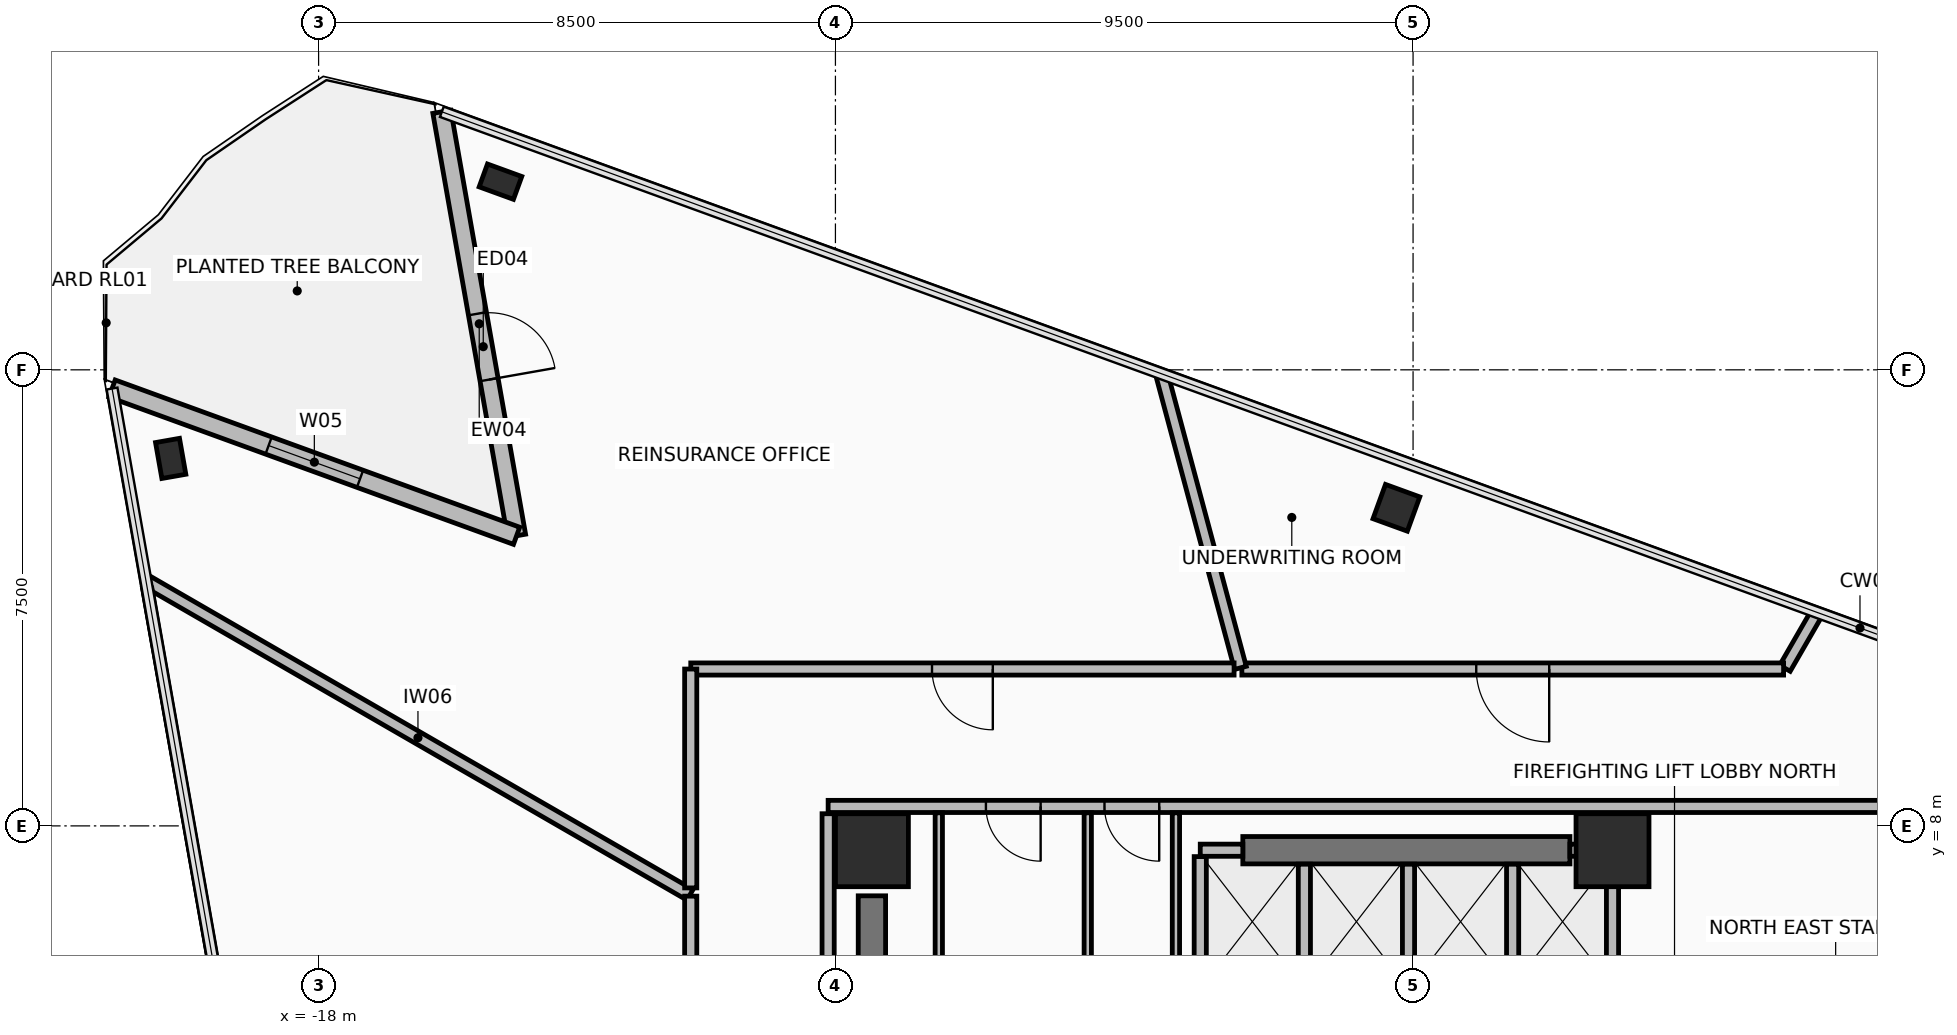
"""IFC4 building model, lengths in metres.
Left out: names, types, materials, properties, quantities, classifications, styles, units other than length and angle.
Written with IfcOpenShell. Run it as: python <this file> out.ifc"""

import sys

from ifc_helpers import new_model, si_unit, direction, frame, frame_2d, origin, origin_2d, place, context, subcontext, project, spatial, rectangle, hollow_rectangle, extrude, element, fill, save


model = new_model("IFC4")
c1 = context("Model", 3, precision=1e-05, world=origin(), true_north=direction((0.0, 1.0)))
c2 = subcontext(c1, "Body", "Model", "MODEL_VIEW")
j1 = project(units=[si_unit("LENGTHUNIT", "METRE"), si_unit("PLANEANGLEUNIT", "RADIAN")], contexts=[c1])
p1 = place(None, origin())
s1 = spatial("IfcSite", under=j1, at=p1, CompositionType="ELEMENT")
p2 = place(p1, origin())
s2 = spatial("IfcBuilding", under=s1, at=p2, CompositionType="ELEMENT")
p3 = place(p2, frame((0.0, 0.0, 177.7)))
s3 = spatial("IfcBuildingStorey", under=s2, at=p3, CompositionType="ELEMENT", Elevation=177.7)
for number, where, z_axis, x_axis in (
    (1, (3.28, 7.6, 0.0), (0.0, 0.0, 1.0), (1.0, 0.0, 0.0)),
    (2, (-8.9, 7.6, 0.0), (0.0, 0.0, 1.0), (1.0, 0.0, 0.0)),
):
    element("IfcColumn", number, at=place(p3, frame(where, z_axis=z_axis, x_axis=x_axis)), inside=s3, PredefinedType="COLUMN", context=c2, shape_type="SweptSolid", body=[
        extrude(rectangle(XDim=1.2, YDim=1.2, at=origin_2d()), origin(), (0.0, 0.0, 1.0), 3.6),
    ])
p4 = place(p3, frame((-20.433, 14.043, 0.0), z_axis=(0.0, 0.0, 1.0), x_axis=(-0.173648177667, 0.984807753012, 0.0)))
e3 = element("IfcColumn", 3, at=p4, inside=s3, PredefinedType="COLUMN", context=c2, shape_type="SweptSolid", body=[
    extrude(hollow_rectangle(XDim=0.4, YDim=0.6, WallThickness=0.03, at=origin_2d()), origin(), (0.0, 0.0, 1.0), 3.6),
])
p5 = place(p3, frame((-0.274, 13.231, 0.0), z_axis=(0.0, 0.0, 1.0), x_axis=(-0.939692023847, 0.342021783398, 0.0)))
e4 = element("IfcColumn", 4, at=p5, inside=s3, PredefinedType="COLUMN", context=c2, shape_type="SweptSolid", body=[
    extrude(hollow_rectangle(XDim=0.6, YDim=0.6, WallThickness=0.036, at=origin_2d()), origin(), (0.0, 0.0, 1.0), 3.6),
])
p6 = place(p3, frame((-15.009, 18.594, 0.0), z_axis=(0.0, 0.0, 1.0), x_axis=(-0.939692023847, 0.342021783398, 0.0)))
e5 = element("IfcColumn", 5, at=p6, inside=s3, PredefinedType="COLUMN", context=c2, shape_type="SweptSolid", body=[
    extrude(hollow_rectangle(XDim=0.4, YDim=0.6, WallThickness=0.03, at=origin_2d()), origin(), (0.0, 0.0, 1.0), 3.6),
])
p7 = place(p3, frame((-15.973, 19.743, 0.0), z_axis=(0.0, 0.0, 1.0), x_axis=(0.173651569749, -0.984807154891, 0.0)))
e6 = element("IfcWall", 6, at=p7, inside=s3, PredefinedType="STANDARD", context=c2, shape_type="SweptSolid", body=[
    extrude(rectangle(XDim=7.08, YDim=0.3, at=frame_2d((3.54, 0.0))), origin(), (0.0, 0.0, 1.0), 2.715),
])
p8 = place(p7, frame((3.372, 0.0, 0.0)))
e7 = element("IfcOpeningElement", 7, at=p8, cuts=e6, PredefinedType="OPENING", context=c2, shape_type="SweptSolid", body=[
    extrude(rectangle(XDim=1.1, YDim=2.2, at=frame_2d((0.55, 1.1))), frame((0.0, 0.16, 0.0), z_axis=(0.0, -1.0, 0.0), x_axis=(1.0, 0.0, 0.0)), (0.0, 0.0, 1.0), 0.32),
])
p9 = place(p3, frame((-14.744, 12.771, 0.0), z_axis=(0.0, 0.0, 1.0), x_axis=(-0.939687665182, 0.342033758429, 0.0)))
e8 = element("IfcWall", 8, at=p9, inside=s3, PredefinedType="STANDARD", context=c2, shape_type="SweptSolid", body=[
    extrude(rectangle(XDim=7.08, YDim=0.3, at=frame_2d((3.54, 0.0))), origin(), (0.0, 0.0, 1.0), 2.715),
])
p10 = place(p9, frame((2.74, 0.0, 0.335)))
e9 = element("IfcOpeningElement", 9, at=p10, cuts=e8, PredefinedType="OPENING", context=c2, shape_type="SweptSolid", body=[
    extrude(rectangle(XDim=1.6, YDim=2.2, at=frame_2d((0.8, 1.1))), frame((0.0, 0.16, 0.0), z_axis=(0.0, -1.0, 0.0), x_axis=(1.0, 0.0, 0.0)), (0.0, 0.0, 1.0), 0.32),
])
p11 = place(p3, frame((-2.8, 7.6, 0.0), z_axis=(0.0, 0.0, 1.0), x_axis=(1.0, 0.0, 0.0)))
e10 = element("IfcWall", 10, at=p11, inside=s3, PredefinedType="SHEAR", context=c2, shape_type="SweptSolid", body=[
    extrude(rectangle(XDim=5.38, YDim=0.45, at=frame_2d((2.69, 0.0))), origin(), (0.0, 0.0, 1.0), 3.42),
])
p12 = place(p3, frame((-8.9, -3.85, 0.0), z_axis=(0.0, 0.0, 1.0), x_axis=(0.0, 1.0, 0.0)))
e11 = element("IfcWall", 11, at=p12, inside=s3, PredefinedType="SHEAR", context=c2, shape_type="SweptSolid", body=[
    extrude(rectangle(XDim=10.7, YDim=0.45, at=frame_2d((5.35, 0.0))), origin(), (0.0, 0.0, 1.0), 3.42),
])
p13 = place(p3, frame((9.62, 8.32, 0.0), z_axis=(0.0, 0.0, 1.0), x_axis=(-1.0, 0.0, 0.0)))
e12 = element("IfcWall", 12, at=p13, inside=s3, PredefinedType="PARTITIONING", context=c2, shape_type="SweptSolid", body=[
    extrude(rectangle(XDim=19.24, YDim=0.2, at=frame_2d((9.62, 0.0))), origin(), (0.0, 0.0, 1.0), 2.765),
])
p14 = place(p13, frame((15.745, 0.0, 0.0)))
e13 = element("IfcOpeningElement", 13, at=p14, cuts=e12, PredefinedType="OPENING", context=c2, shape_type="SweptSolid", body=[
    extrude(rectangle(XDim=0.9, YDim=2.1, at=frame_2d((0.45, 1.05))), frame((0.0, 0.11, 0.0), z_axis=(0.0, -1.0, 0.0), x_axis=(1.0, 0.0, 0.0)), (0.0, 0.0, 1.0), 0.22),
])
p15 = place(p13, frame((13.795, 0.0, 0.0)))
e14 = element("IfcOpeningElement", 14, at=p15, cuts=e12, PredefinedType="OPENING", context=c2, shape_type="SweptSolid", body=[
    extrude(rectangle(XDim=0.9, YDim=2.1, at=frame_2d((0.45, 1.05))), frame((0.0, 0.11, 0.0), z_axis=(0.0, -1.0, 0.0), x_axis=(1.0, 0.0, 0.0)), (0.0, 0.0, 1.0), 0.22),
])
p16 = place(p3, frame((-9.62, 8.2, 0.0), z_axis=(0.0, 0.0, 1.0), x_axis=(0.0, -1.0, 0.0)))
e15 = element("IfcWall", 15, at=p16, inside=s3, PredefinedType="PARTITIONING", context=c2, shape_type="SweptSolid", body=[
    extrude(rectangle(XDim=16.4, YDim=0.2, at=frame_2d((8.2, 0.0))), origin(), (0.0, 0.0, 1.0), 2.765),
])
p17 = place(p16, frame((12.65, 0.0, 0.0)))
e16 = element("IfcOpeningElement", 16, at=p17, cuts=e15, PredefinedType="OPENING", context=c2, shape_type="SweptSolid", body=[
    extrude(rectangle(XDim=1.1, YDim=2.15, at=frame_2d((0.55, 1.075))), frame((0.0, 0.11, 0.0), z_axis=(0.0, -1.0, 0.0), x_axis=(1.0, 0.0, 0.0)), (0.0, 0.0, 1.0), 0.22),
])
p18 = place(p3, frame((-3.5, 7.6, 0.0), z_axis=(0.0, 0.0, 1.0), x_axis=(1.0, 0.0, 0.0)))
e17 = element("IfcWall", 17, at=p18, inside=s3, PredefinedType="PARTITIONING", context=c2, shape_type="SweptSolid", body=[
    extrude(rectangle(XDim=0.7, YDim=0.2, at=frame_2d((0.35, 0.0))), origin(), (0.0, 0.0, 1.0), 2.715),
])
p19 = place(p3, frame((-3.5, 5.38, 0.0), z_axis=(0.0, 0.0, 1.0), x_axis=(0.0, 1.0, 0.0)))
e18 = element("IfcWall", 18, at=p19, inside=s3, PredefinedType="PARTITIONING", context=c2, shape_type="SweptSolid", body=[
    extrude(rectangle(XDim=2.115, YDim=0.2, at=frame_2d((1.058, 0.0))), origin(), (0.0, 0.0, 1.0), 2.715),
])
for number, where, z_axis, x_axis in (
    (19, (-1.788, 5.38, 0.0), (0.0, 0.0, 1.0), (0.0, 1.0, 0.0)),
    (20, (-0.075, 5.38, 0.0), (0.0, 0.0, 1.0), (0.0, 1.0, 0.0)),
    (21, (1.637, 5.38, 0.0), (0.0, 0.0, 1.0), (0.0, 1.0, 0.0)),
):
    element("IfcWall", number, at=place(p3, frame(where, z_axis=z_axis, x_axis=x_axis)), inside=s3, PredefinedType="PARTITIONING", context=c2, shape_type="SweptSolid", body=[
        extrude(rectangle(XDim=1.99, YDim=0.2, at=frame_2d((0.995, 0.0))), origin(), (0.0, 0.0, 1.0), 2.715),
    ])
p20 = place(p3, frame((2.58, 7.6, 0.0), z_axis=(0.0, 0.0, 1.0), x_axis=(1.0, 0.0, 0.0)))
e22 = element("IfcWall", 22, at=p20, inside=s3, PredefinedType="PARTITIONING", context=c2, shape_type="SweptSolid", body=[
    extrude(rectangle(XDim=0.7, YDim=0.2, at=frame_2d((0.35, 0.0))), origin(), (0.0, 0.0, 1.0), 2.715),
])
p21 = place(p3, frame((3.28, 5.38, 0.0), z_axis=(0.0, 0.0, 1.0), x_axis=(0.0, 1.0, 0.0)))
e23 = element("IfcWall", 23, at=p21, inside=s3, PredefinedType="PARTITIONING", context=c2, shape_type="SweptSolid", body=[
    extrude(rectangle(XDim=2.115, YDim=0.2, at=frame_2d((1.058, 0.0))), origin(), (0.0, 0.0, 1.0), 2.715),
])
for number, where, z_axis, x_axis in (
    (24, (-5.35, 4.765, 0.0), (0.0, 0.0, 1.0), (0.0, 1.0, 0.0)),
    (25, (-7.8, 8.215, 0.0), (0.0, 0.0, 1.0), (0.0, -1.0, 0.0)),
    (26, (-3.9, 4.765, 0.0), (0.0, 0.0, 1.0), (0.0, 1.0, 0.0)),
):
    element("IfcWall", number, at=place(p3, frame(where, z_axis=z_axis, x_axis=x_axis)), inside=s3, PredefinedType="PARTITIONING", context=c2, shape_type="SweptSolid", body=[
        extrude(rectangle(XDim=3.45, YDim=0.12, at=frame_2d((1.725, 0.0))), origin(), (0.0, 0.0, 1.0), 2.715),
    ])
p22 = place(p3, frame((-20.839, 12.031, 0.0), z_axis=(0.0, 0.0, 1.0), x_axis=(0.866031318101, -0.499989755964, 0.0)))
e27 = element("IfcWall", 27, at=p22, inside=s3, PredefinedType="PARTITIONING", context=c2, shape_type="SweptSolid", body=[
    extrude(rectangle(XDim=10.331, YDim=0.2, at=frame_2d((5.166, 0.0))), origin(), (0.0, 0.0, 1.0), 2.715),
])
p23 = place(p3, frame((-11.88, 6.844, 0.0), z_axis=(0.0, 0.0, 1.0), x_axis=(0.0, -1.0, 0.0)))
e28 = element("IfcWall", 28, at=p23, inside=s3, PredefinedType="PARTITIONING", context=c2, shape_type="SweptSolid", body=[
    extrude(rectangle(XDim=10.009, YDim=0.2, at=frame_2d((5.004, 0.0))), origin(), (0.0, 0.0, 1.0), 3.42),
])
p24 = place(p23, frame((4.579, 0.0, 0.0)))
e29 = element("IfcOpeningElement", 29, at=p24, cuts=e28, PredefinedType="OPENING", context=c2, shape_type="SweptSolid", body=[
    extrude(rectangle(XDim=0.85, YDim=2.1, at=frame_2d((0.425, 1.05))), frame((0.0, 0.11, 0.0), z_axis=(0.0, -1.0, 0.0), x_axis=(1.0, 0.0, 0.0)), (0.0, 0.0, 1.0), 0.22),
])
p25 = place(p3, frame((-17.878, -4.762, 0.0), z_axis=(0.0, 0.0, 1.0), x_axis=(-0.173655243618, 0.984806507068, 0.0)))
e30 = element("IfcWall", 30, at=p25, inside=s3, PredefinedType="PARTITIONING", context=c2, shape_type="SweptSolid", body=[
    extrude(rectangle(XDim=16.916, YDim=0.15, at=frame_2d((8.458, 0.0))), origin(), (0.0, 0.0, 1.0), 3.42),
])
p26 = place(p3, frame((6.631, 11.485, 0.0), z_axis=(0.0, 0.0, 1.0), x_axis=(-0.500139438976, -0.865944883685, 0.0)))
e31 = element("IfcWall", 31, at=p26, inside=s3, PredefinedType="PARTITIONING", context=c2, shape_type="SweptSolid", body=[
    extrude(rectangle(XDim=1.031, YDim=0.2, at=frame_2d((0.515, 0.0))), origin(), (0.0, 0.0, 1.0), 2.715),
])
p27 = place(p3, frame((6.094, 10.58, 0.0), z_axis=(0.0, 0.0, 1.0), x_axis=(-1.0, 0.0, 0.0)))
e32 = element("IfcWall", 32, at=p27, inside=s3, PredefinedType="PARTITIONING", context=c2, shape_type="SweptSolid", body=[
    extrude(rectangle(XDim=8.91, YDim=0.2, at=frame_2d((4.455, 0.0))), origin(), (0.0, 0.0, 1.0), 2.865),
])
p28 = place(p27, frame((3.855, 0.0, 0.0)))
e33 = element("IfcOpeningElement", 33, at=p28, cuts=e32, PredefinedType="OPENING", context=c2, shape_type="SweptSolid", body=[
    extrude(rectangle(XDim=1.2, YDim=2.15, at=frame_2d((0.6, 1.075))), frame((0.0, 0.11, 0.0), z_axis=(0.0, -1.0, 0.0), x_axis=(1.0, 0.0, 0.0)), (0.0, 0.0, 1.0), 0.22),
])
p29 = place(p3, frame((-2.84, 10.598, 0.0), z_axis=(0.0, 0.0, 1.0), x_axis=(-0.258815701251, 0.965926722265, 0.0)))
e34 = element("IfcWall", 34, at=p29, inside=s3, PredefinedType="PARTITIONING", context=c2, shape_type="SweptSolid", body=[
    extrude(rectangle(XDim=5.007, YDim=0.2, at=frame_2d((2.503, 0.0))), origin(), (0.0, 0.0, 1.0), 2.715),
])
p30 = place(p3, frame((-2.944, 10.58, 0.0), z_axis=(0.0, 0.0, 1.0), x_axis=(-1.0, 0.0, 0.0)))
e35 = element("IfcWall", 35, at=p30, inside=s3, PredefinedType="PARTITIONING", context=c2, shape_type="SweptSolid", body=[
    extrude(rectangle(XDim=8.936, YDim=0.2, at=frame_2d((4.468, 0.0))), origin(), (0.0, 0.0, 1.0), 2.765),
])
p31 = place(p30, frame((3.968, 0.0, 0.0)))
e36 = element("IfcOpeningElement", 36, at=p31, cuts=e35, PredefinedType="OPENING", context=c2, shape_type="SweptSolid", body=[
    extrude(rectangle(XDim=1.0, YDim=2.15, at=frame_2d((0.5, 1.075))), frame((0.0, 0.11, 0.0), z_axis=(0.0, -1.0, 0.0), x_axis=(1.0, 0.0, 0.0)), (0.0, 0.0, 1.0), 0.22),
])
p32 = place(p3, frame((-11.88, 10.579, 0.0), z_axis=(0.0, 0.0, 1.0), x_axis=(0.0, -1.0, 0.0)))
e37 = element("IfcWall", 37, at=p32, inside=s3, PredefinedType="PARTITIONING", context=c2, shape_type="SweptSolid", body=[
    extrude(rectangle(XDim=3.599, YDim=0.2, at=frame_2d((1.8, 0.0))), origin(), (0.0, 0.0, 1.0), 2.765),
])
p33 = place(p8, frame((1.1, 0.0, 0.0), z_axis=(0.0, 0.0, 1.0), x_axis=(-1.0, 0.0, 0.0)))
e38 = element("IfcDoor", 38, at=p33, inside=s3, OperationType="SINGLE_SWING_LEFT", PredefinedType="DOOR", context=c2, shape_type="SweptSolid", body=[
    extrude(rectangle(XDim=1.1, YDim=2.2, at=frame_2d((0.55, 1.1))), frame((0.0, 0.025, 0.0), z_axis=(0.0, -1.0, 0.0), x_axis=(1.0, 0.0, 0.0)), (0.0, 0.0, 1.0), 0.05),
])
fill(e7, e38)
p34 = place(p10, origin())
e39 = element("IfcWindow", 39, at=p34, inside=s3, PartitioningType="SINGLE_PANEL", PredefinedType="WINDOW", context=c2, shape_type="SweptSolid", body=[
    extrude(rectangle(XDim=1.6, YDim=2.2, at=frame_2d((0.8, 1.1))), frame((0.0, 0.03, 0.0), z_axis=(0.0, -1.0, 0.0), x_axis=(1.0, 0.0, 0.0)), (0.0, 0.0, 1.0), 0.06),
])
fill(e9, e39)
p35 = place(p14, origin())
e40 = element("IfcDoor", 40, at=p35, inside=s3, OperationType="SINGLE_SWING_LEFT", PredefinedType="DOOR", context=c2, shape_type="SweptSolid", body=[
    extrude(rectangle(XDim=0.9, YDim=2.1, at=frame_2d((0.45, 1.05))), frame((0.0, 0.025, 0.0), z_axis=(0.0, -1.0, 0.0), x_axis=(1.0, 0.0, 0.0)), (0.0, 0.0, 1.0), 0.05),
])
fill(e13, e40)
p36 = place(p15, origin())
e41 = element("IfcDoor", 41, at=p36, inside=s3, OperationType="SINGLE_SWING_LEFT", PredefinedType="DOOR", context=c2, shape_type="SweptSolid", body=[
    extrude(rectangle(XDim=0.9, YDim=2.1, at=frame_2d((0.45, 1.05))), frame((0.0, 0.025, 0.0), z_axis=(0.0, -1.0, 0.0), x_axis=(1.0, 0.0, 0.0)), (0.0, 0.0, 1.0), 0.05),
])
fill(e14, e41)
p37 = place(p28, origin())
e42 = element("IfcDoor", 42, at=p37, inside=s3, OperationType="SINGLE_SWING_LEFT", PredefinedType="DOOR", context=c2, shape_type="SweptSolid", body=[
    extrude(rectangle(XDim=1.2, YDim=2.15, at=frame_2d((0.6, 1.075))), frame((0.0, 0.025, 0.0), z_axis=(0.0, -1.0, 0.0), x_axis=(1.0, 0.0, 0.0)), (0.0, 0.0, 1.0), 0.05),
])
fill(e33, e42)
p38 = place(p31, origin())
e43 = element("IfcDoor", 43, at=p38, inside=s3, OperationType="SINGLE_SWING_RIGHT", PredefinedType="DOOR", context=c2, shape_type="SweptSolid", body=[
    extrude(rectangle(XDim=1.0, YDim=2.15, at=frame_2d((0.5, 1.075))), frame((0.0, 0.025, 0.0), z_axis=(0.0, -1.0, 0.0), x_axis=(1.0, 0.0, 0.0)), (0.0, 0.0, 1.0), 0.05),
])
fill(e36, e43)
save(model, sys.argv[1])
